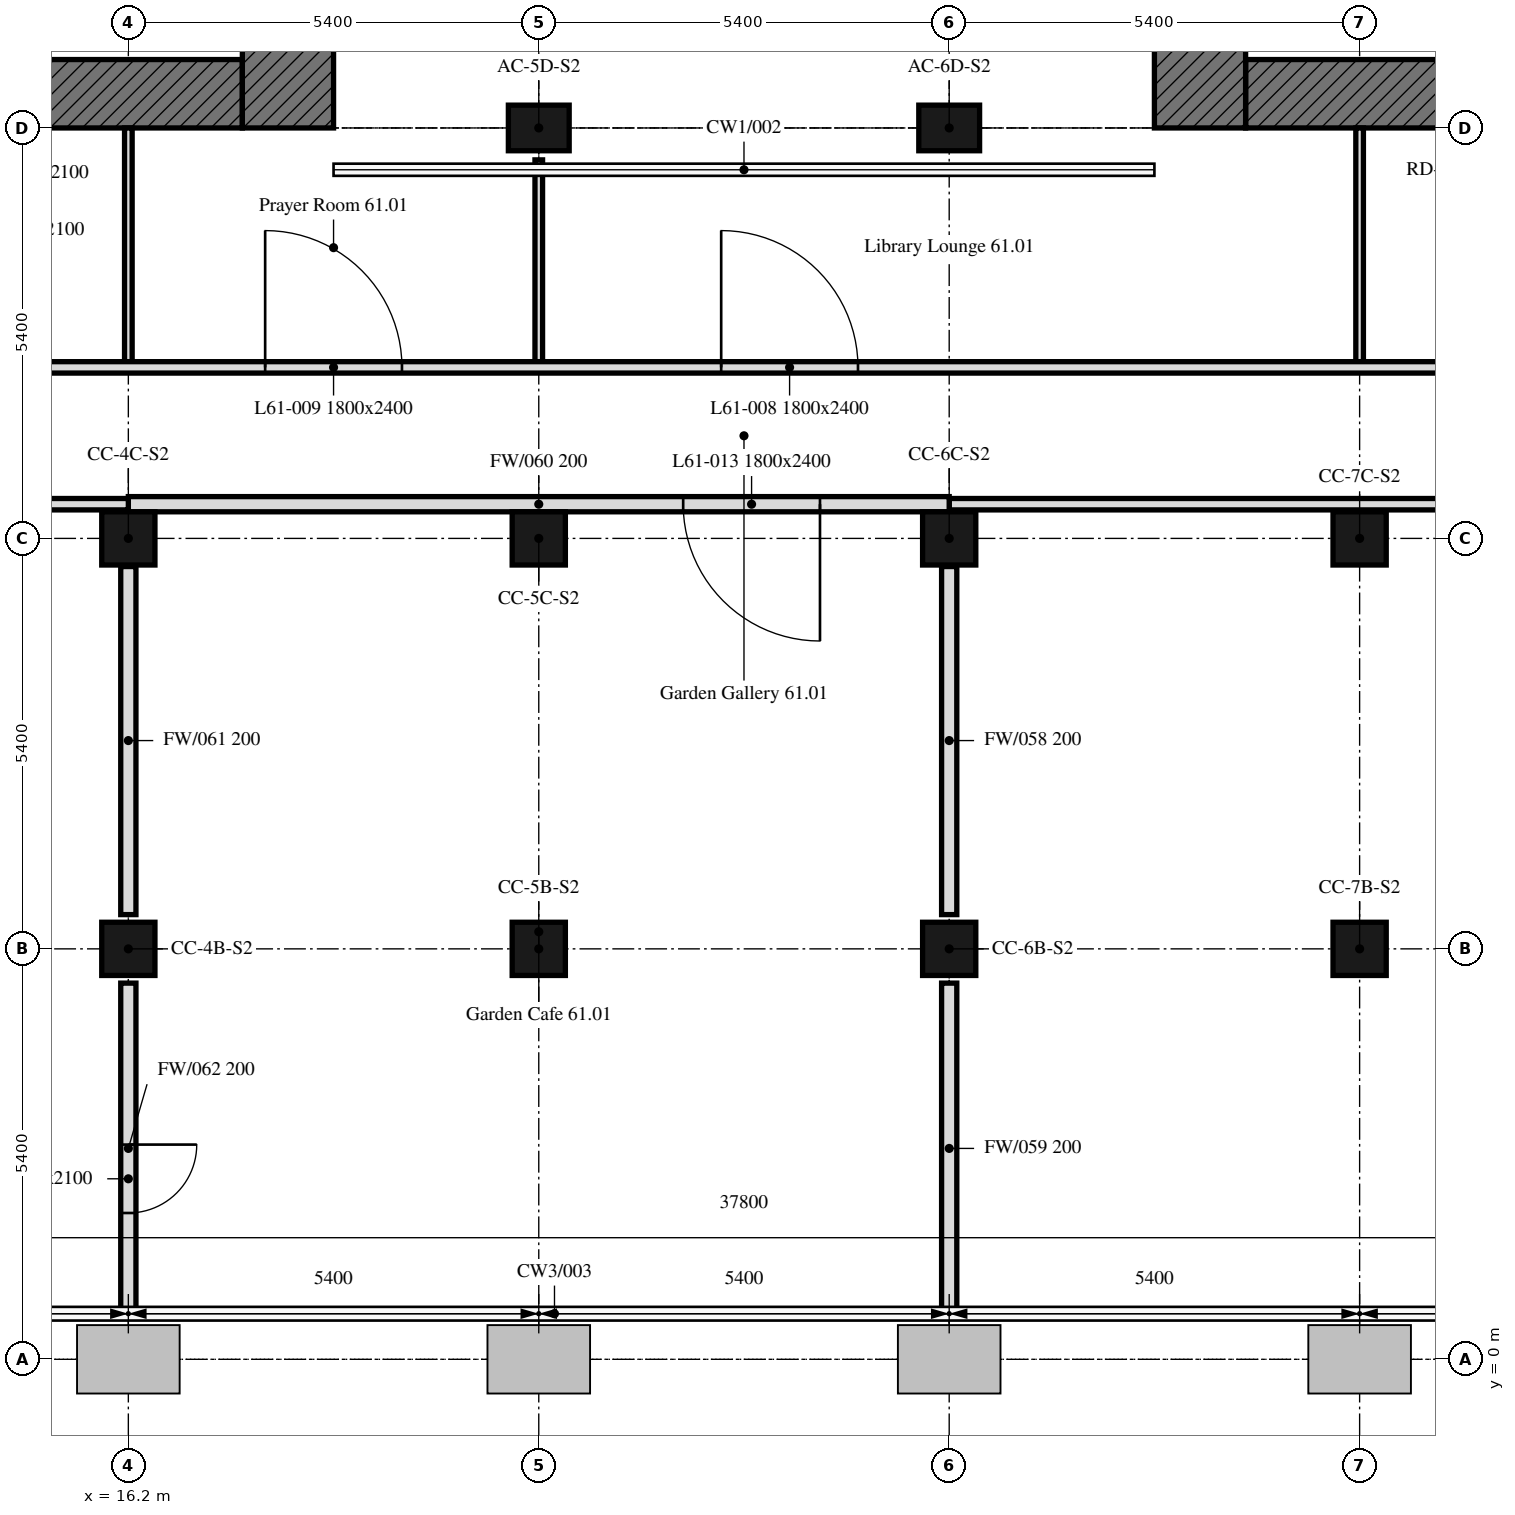
"""IFC4 building model, lengths in metres.
Left out: names, types, materials, properties, quantities, classifications, styles, units other than length and angle.
Written with IfcOpenShell. Run it as: python <this file> out.ifc"""

import sys

from ifc_helpers import new_model, si_unit, direction, frame, frame_2d, origin, origin_2d, place, context, subcontext, project, spatial, rectangle, extrude, element, fill, save


model = new_model("IFC4")
c1 = context("Model", 3, precision=1e-05, world=origin(), true_north=direction((0.0, 1.0)))
c2 = subcontext(c1, "Body", "Model", "MODEL_VIEW")
j1 = project(units=[si_unit("LENGTHUNIT", "METRE"), si_unit("PLANEANGLEUNIT", "RADIAN")], contexts=[c1])
p1 = place(None, origin())
s1 = spatial("IfcSite", under=j1, at=p1, CompositionType="ELEMENT")
p2 = place(p1, origin())
s2 = spatial("IfcBuilding", under=s1, at=p2, CompositionType="ELEMENT")
p3 = place(p2, frame((0.0, 0.0, 250.9)))
s3 = spatial("IfcBuildingStorey", under=s2, at=p3, CompositionType="ELEMENT", Elevation=250.9)
for number, where, z_axis, x_axis in (
    (1, (16.2, 5.4, 0.0), (0.0, 0.0, 1.0), (1.0, 0.0, 0.0)),
    (2, (21.6, 5.4, 0.0), (0.0, 0.0, 1.0), (1.0, 0.0, 0.0)),
    (3, (27.0, 5.4, 0.0), (0.0, 0.0, 1.0), (1.0, 0.0, 0.0)),
    (4, (32.4, 5.4, 0.0), (0.0, 0.0, 1.0), (1.0, 0.0, 0.0)),
    (5, (16.2, 10.8, 0.0), (0.0, 0.0, 1.0), (1.0, 0.0, 0.0)),
    (6, (21.6, 10.8, 0.0), (0.0, 0.0, 1.0), (1.0, 0.0, 0.0)),
    (7, (27.0, 10.8, 0.0), (0.0, 0.0, 1.0), (1.0, 0.0, 0.0)),
    (8, (32.4, 10.8, 0.0), (0.0, 0.0, 1.0), (1.0, 0.0, 0.0)),
):
    element("IfcColumn", number, at=place(p3, frame(where, z_axis=z_axis, x_axis=x_axis)), inside=s3, PredefinedType="COLUMN", context=c2, shape_type="SweptSolid", body=[
        extrude(rectangle(XDim=0.7, YDim=0.7, at=origin_2d()), origin(), (0.0, 0.0, 1.0), 4.5),
    ])
for number, where, z_axis, x_axis in (
    (9, (21.6, 16.2, 0.0), (0.0, 0.0, 1.0), (1.0, 0.0, 0.0)),
    (10, (27.0, 16.2, 0.0), (0.0, 0.0, 1.0), (1.0, 0.0, 0.0)),
):
    element("IfcColumn", number, at=place(p3, frame(where, z_axis=z_axis, x_axis=x_axis)), inside=s3, PredefinedType="COLUMN", context=c2, shape_type="SweptSolid", body=[
        extrude(rectangle(XDim=0.8, YDim=0.6, at=origin_2d()), origin(), (0.0, 0.0, 1.0), 4.5),
    ])
p4 = place(p3, frame((17.7, 16.65, 0.0), z_axis=(0.0, 0.0, 1.0), x_axis=(-1.0, 0.0, 0.0)))
e11 = element("IfcWall", 11, at=p4, inside=s3, PredefinedType="SOLIDWALL", context=c2, shape_type="SweptSolid", body=[
    extrude(rectangle(XDim=11.1, YDim=0.9, at=frame_2d((5.55, 0.0))), origin(), (0.0, 0.0, 1.0), 4.5),
])
p5 = place(p4, frame((5.55, 0.0, 0.0)))
e12 = element("IfcOpeningElement", 12, at=p5, cuts=e11, PredefinedType="OPENING", context=c2, shape_type="SweptSolid", body=[
    extrude(rectangle(XDim=2.0, YDim=2.4, at=frame_2d((1.0, 1.2))), frame((0.0, 0.45, 0.0), z_axis=(0.0, -1.0, 0.0), x_axis=(1.0, 0.0, 0.0)), (0.0, 0.0, 1.0), 0.9),
])
p6 = place(p3, frame((18.3, 32.4, 0.0), z_axis=(0.0, 0.0, 1.0), x_axis=(0.0, -1.0, 0.0)))
e13 = element("IfcWall", 13, at=p6, inside=s3, PredefinedType="SOLIDWALL", context=c2, shape_type="SweptSolid", body=[
    extrude(rectangle(XDim=16.2, YDim=1.2, at=frame_2d((8.1, 0.0))), origin(), (0.0, 0.0, 1.0), 4.5),
])
p7 = place(p3, frame((42.0, 16.65, 0.0), z_axis=(0.0, 0.0, 1.0), x_axis=(-1.0, 0.0, 0.0)))
e14 = element("IfcWall", 14, at=p7, inside=s3, PredefinedType="SOLIDWALL", context=c2, shape_type="SweptSolid", body=[
    extrude(rectangle(XDim=11.1, YDim=0.9, at=frame_2d((5.55, 0.0))), origin(), (0.0, 0.0, 1.0), 4.5),
])
p8 = place(p7, frame((3.55, 0.0, 0.0)))
e15 = element("IfcOpeningElement", 15, at=p8, cuts=e14, PredefinedType="OPENING", context=c2, shape_type="SweptSolid", body=[
    extrude(rectangle(XDim=2.0, YDim=2.4, at=frame_2d((1.0, 1.2))), frame((0.0, 0.45, 0.0), z_axis=(0.0, -1.0, 0.0), x_axis=(1.0, 0.0, 0.0)), (0.0, 0.0, 1.0), 0.9),
])
p9 = place(p3, frame((30.3, 16.2, 0.0), z_axis=(0.0, 0.0, 1.0), x_axis=(0.0, 1.0, 0.0)))
e16 = element("IfcWall", 16, at=p9, inside=s3, PredefinedType="SOLIDWALL", context=c2, shape_type="SweptSolid", body=[
    extrude(rectangle(XDim=16.2, YDim=1.2, at=frame_2d((8.1, 0.0))), origin(), (0.0, 0.0, 1.0), 4.5),
])
p10 = place(p3, frame((42.6, 11.25, 0.0), z_axis=(0.0, 0.0, 1.0), x_axis=(-1.0, 0.0, 0.0)))
e17 = element("IfcWall", 17, at=p10, inside=s3, PredefinedType="PARTITIONING", context=c2, shape_type="SweptSolid", body=[
    extrude(rectangle(XDim=15.6, YDim=0.15, at=frame_2d((7.8, 0.0))), origin(), (0.0, 0.0, 1.0), 3.75),
])
p11 = place(p10, frame((6.6, 0.0, 0.0)))
e18 = element("IfcOpeningElement", 18, at=p11, cuts=e17, PredefinedType="OPENING", context=c2, shape_type="SweptSolid", body=[
    extrude(rectangle(XDim=1.8, YDim=2.4, at=frame_2d((0.9, 1.2))), frame((0.0, 0.075, 0.0), z_axis=(0.0, -1.0, 0.0), x_axis=(1.0, 0.0, 0.0)), (0.0, 0.0, 1.0), 0.15),
])
p12 = place(p3, frame((27.0, 10.43, 0.0), z_axis=(0.0, 0.0, 1.0), x_axis=(0.0, -1.0, 0.0)))
e19 = element("IfcWall", 19, at=p12, inside=s3, PredefinedType="PARTITIONING", context=c2, shape_type="SweptSolid", body=[
    extrude(rectangle(XDim=4.579, YDim=0.2, at=frame_2d((2.29, 0.0))), origin(), (0.0, 0.0, 1.0), 3.75),
])
p13 = place(p3, frame((27.0, 4.949, 0.0), z_axis=(0.0, 0.0, 1.0), x_axis=(0.0, -1.0, 0.0)))
e20 = element("IfcWall", 20, at=p13, inside=s3, PredefinedType="PARTITIONING", context=c2, shape_type="SweptSolid", body=[
    extrude(rectangle(XDim=4.349, YDim=0.2, at=frame_2d((2.175, 0.0))), origin(), (0.0, 0.0, 1.0), 3.75),
])
p14 = place(p3, frame((27.0, 11.25, 0.0), z_axis=(0.0, 0.0, 1.0), x_axis=(-1.0, 0.0, 0.0)))
e21 = element("IfcWall", 21, at=p14, inside=s3, PredefinedType="PARTITIONING", context=c2, shape_type="SweptSolid", body=[
    extrude(rectangle(XDim=10.8, YDim=0.2, at=frame_2d((5.4, 0.0))), origin(), (0.0, 0.0, 1.0), 3.75),
])
p15 = place(p14, frame((1.7, 0.0, 0.0)))
e22 = element("IfcOpeningElement", 22, at=p15, cuts=e21, PredefinedType="OPENING", context=c2, shape_type="SweptSolid", body=[
    extrude(rectangle(XDim=1.8, YDim=2.4, at=frame_2d((0.9, 1.2))), frame((0.0, 0.1, 0.0), z_axis=(0.0, -1.0, 0.0), x_axis=(1.0, 0.0, 0.0)), (0.0, 0.0, 1.0), 0.2),
])
p16 = place(p3, frame((16.2, 10.43, 0.0), z_axis=(0.0, 0.0, 1.0), x_axis=(0.0, -1.0, 0.0)))
e23 = element("IfcWall", 23, at=p16, inside=s3, PredefinedType="PARTITIONING", context=c2, shape_type="SweptSolid", body=[
    extrude(rectangle(XDim=4.579, YDim=0.2, at=frame_2d((2.29, 0.0))), origin(), (0.0, 0.0, 1.0), 3.75),
])
p17 = place(p3, frame((16.2, 4.949, 0.0), z_axis=(0.0, 0.0, 1.0), x_axis=(0.0, -1.0, 0.0)))
e24 = element("IfcWall", 24, at=p17, inside=s3, PredefinedType="PARTITIONING", context=c2, shape_type="SweptSolid", body=[
    extrude(rectangle(XDim=4.349, YDim=0.2, at=frame_2d((2.175, 0.0))), origin(), (0.0, 0.0, 1.0), 3.75),
])
p18 = place(p17, frame((2.124, 0.0, 0.0)))
e25 = element("IfcOpeningElement", 25, at=p18, cuts=e24, PredefinedType="OPENING", context=c2, shape_type="SweptSolid", body=[
    extrude(rectangle(XDim=0.9, YDim=2.1, at=frame_2d((0.45, 1.05))), frame((0.0, 0.1, 0.0), z_axis=(0.0, -1.0, 0.0), x_axis=(1.0, 0.0, 0.0)), (0.0, 0.0, 1.0), 0.2),
])
p19 = place(p3, frame((16.2, 11.25, 0.0), z_axis=(0.0, 0.0, 1.0), x_axis=(-1.0, 0.0, 0.0)))
e26 = element("IfcWall", 26, at=p19, inside=s3, PredefinedType="PARTITIONING", context=c2, shape_type="SweptSolid", body=[
    extrude(rectangle(XDim=10.049, YDim=0.15, at=frame_2d((5.024, 0.0))), origin(), (0.0, 0.0, 1.0), 3.75),
])
p20 = place(p19, frame((7.2, 0.0, 0.0)))
e27 = element("IfcOpeningElement", 27, at=p20, cuts=e26, PredefinedType="OPENING", context=c2, shape_type="SweptSolid", body=[
    extrude(rectangle(XDim=1.8, YDim=2.4, at=frame_2d((0.9, 1.2))), frame((0.0, 0.075, 0.0), z_axis=(0.0, -1.0, 0.0), x_axis=(1.0, 0.0, 0.0)), (0.0, 0.0, 1.0), 0.15),
])
p21 = place(p19, frame((1.8, 0.0, 0.0)))
e28 = element("IfcOpeningElement", 28, at=p21, cuts=e26, PredefinedType="OPENING", context=c2, shape_type="SweptSolid", body=[
    extrude(rectangle(XDim=1.8, YDim=2.4, at=frame_2d((0.9, 1.2))), frame((0.0, 0.075, 0.0), z_axis=(0.0, -1.0, 0.0), x_axis=(1.0, 0.0, 0.0)), (0.0, 0.0, 1.0), 0.15),
])
p22 = place(p3, frame((32.4, 13.125, 0.0), z_axis=(0.0, 0.0, 1.0), x_axis=(0.0, 1.0, 0.0)))
e29 = element("IfcWall", 29, at=p22, inside=s3, PredefinedType="PARTITIONING", context=c2, shape_type="SweptSolid", body=[
    extrude(rectangle(XDim=3.075, YDim=0.1, at=frame_2d((1.538, 0.0))), origin(), (0.0, 0.0, 1.0), 3.75),
])
p23 = place(p3, frame((21.6, 15.78, 0.0), z_axis=(0.0, 0.0, 1.0), x_axis=(0.0, -1.0, 0.0)))
e30 = element("IfcWall", 30, at=p23, inside=s3, PredefinedType="PARTITIONING", context=c2, shape_type="SweptSolid", body=[
    extrude(rectangle(XDim=2.655, YDim=0.1, at=frame_2d((1.328, 0.0))), origin(), (0.0, 0.0, 1.0), 3.75),
])
p24 = place(p3, frame((16.2, 16.2, 0.0), z_axis=(0.0, 0.0, 1.0), x_axis=(0.0, -1.0, 0.0)))
e31 = element("IfcWall", 31, at=p24, inside=s3, PredefinedType="PARTITIONING", context=c2, shape_type="SweptSolid", body=[
    extrude(rectangle(XDim=3.075, YDim=0.1, at=frame_2d((1.538, 0.0))), origin(), (0.0, 0.0, 1.0), 3.75),
])
p25 = place(p3, frame((6.151, 13.05, 0.0), z_axis=(0.0, 0.0, 1.0), x_axis=(1.0, 0.0, 0.0)))
e32 = element("IfcWall", 32, at=p25, inside=s3, PredefinedType="PARTITIONING", context=c2, shape_type="SweptSolid", body=[
    extrude(rectangle(XDim=36.449, YDim=0.15, at=frame_2d((18.225, 0.0))), origin(), (0.0, 0.0, 1.0), 3.75),
])
p26 = place(p25, frame((17.849, 0.0, 0.0)))
e33 = element("IfcOpeningElement", 33, at=p26, cuts=e32, PredefinedType="OPENING", context=c2, shape_type="SweptSolid", body=[
    extrude(rectangle(XDim=1.8, YDim=2.4, at=frame_2d((0.9, 1.2))), frame((0.0, 0.075, 0.0), z_axis=(0.0, -1.0, 0.0), x_axis=(1.0, 0.0, 0.0)), (0.0, 0.0, 1.0), 0.15),
])
p27 = place(p25, frame((11.849, 0.0, 0.0)))
e34 = element("IfcOpeningElement", 34, at=p27, cuts=e32, PredefinedType="OPENING", context=c2, shape_type="SweptSolid", body=[
    extrude(rectangle(XDim=1.8, YDim=2.4, at=frame_2d((0.9, 1.2))), frame((0.0, 0.075, 0.0), z_axis=(0.0, -1.0, 0.0), x_axis=(1.0, 0.0, 0.0)), (0.0, 0.0, 1.0), 0.15),
])
p28 = place(p25, frame((28.649, 0.0, 0.0)))
e35 = element("IfcOpeningElement", 35, at=p28, cuts=e32, PredefinedType="OPENING", context=c2, shape_type="SweptSolid", body=[
    extrude(rectangle(XDim=1.8, YDim=2.4, at=frame_2d((0.9, 1.2))), frame((0.0, 0.075, 0.0), z_axis=(0.0, -1.0, 0.0), x_axis=(1.0, 0.0, 0.0)), (0.0, 0.0, 1.0), 0.15),
])
p29 = place(p25, frame((1.649, 0.0, 0.0)))
e36 = element("IfcOpeningElement", 36, at=p29, cuts=e32, PredefinedType="OPENING", context=c2, shape_type="SweptSolid", body=[
    extrude(rectangle(XDim=1.8, YDim=2.4, at=frame_2d((0.9, 1.2))), frame((0.0, 0.075, 0.0), z_axis=(0.0, -1.0, 0.0), x_axis=(1.0, 0.0, 0.0)), (0.0, 0.0, 1.0), 0.15),
])
p30 = place(p26, origin())
e37 = element("IfcDoor", 37, at=p30, inside=s3, OperationType="DOUBLE_DOOR_SINGLE_SWING", PredefinedType="DOOR", context=c2, shape_type="SweptSolid", body=[
    extrude(rectangle(XDim=1.8, YDim=2.4, at=frame_2d((0.9, 1.2))), frame((0.0, 0.025, 0.0), z_axis=(0.0, -1.0, 0.0), x_axis=(1.0, 0.0, 0.0)), (0.0, 0.0, 1.0), 0.05),
])
fill(e33, e37)
p31 = place(p27, origin())
e38 = element("IfcDoor", 38, at=p31, inside=s3, OperationType="DOUBLE_DOOR_SINGLE_SWING", PredefinedType="DOOR", context=c2, shape_type="SweptSolid", body=[
    extrude(rectangle(XDim=1.8, YDim=2.4, at=frame_2d((0.9, 1.2))), frame((0.0, 0.025, 0.0), z_axis=(0.0, -1.0, 0.0), x_axis=(1.0, 0.0, 0.0)), (0.0, 0.0, 1.0), 0.05),
])
fill(e34, e38)
p32 = place(p18, origin())
e39 = element("IfcDoor", 39, at=p32, inside=s3, OperationType="SINGLE_SWING_RIGHT", PredefinedType="DOOR", context=c2, shape_type="SweptSolid", body=[
    extrude(rectangle(XDim=0.9, YDim=2.1, at=frame_2d((0.45, 1.05))), frame((0.0, 0.025, 0.0), z_axis=(0.0, -1.0, 0.0), x_axis=(1.0, 0.0, 0.0)), (0.0, 0.0, 1.0), 0.05),
])
fill(e25, e39)
p33 = place(p15, origin())
e40 = element("IfcDoor", 40, at=p33, inside=s3, OperationType="DOUBLE_DOOR_SINGLE_SWING", PredefinedType="DOOR", context=c2, shape_type="SweptSolid", body=[
    extrude(rectangle(XDim=1.8, YDim=2.4, at=frame_2d((0.9, 1.2))), frame((0.0, 0.025, 0.0), z_axis=(0.0, -1.0, 0.0), x_axis=(1.0, 0.0, 0.0)), (0.0, 0.0, 1.0), 0.05),
])
fill(e22, e40)
save(model, sys.argv[1])
